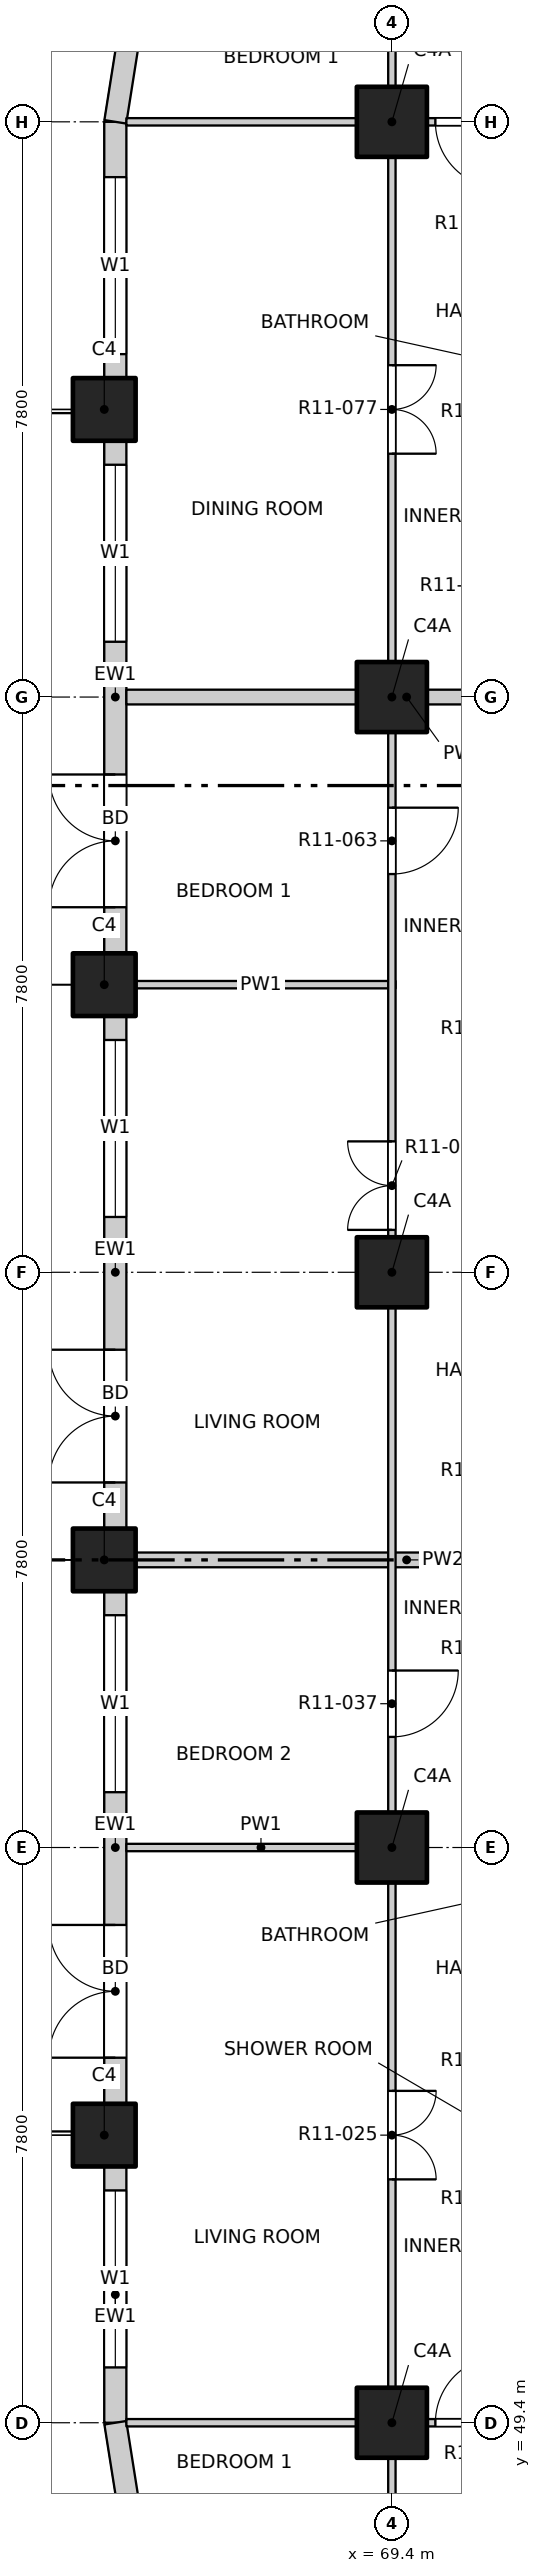
"""IFC4 building model, lengths in metres.
Left out: names, types, materials, properties, quantities, classifications, styles, units other than length and angle.
Written with IfcOpenShell. Run it as: python <this file> out.ifc"""

import sys

from ifc_helpers import new_model, si_unit, direction, frame, frame_2d, origin, origin_2d, place, context, subcontext, project, spatial, rectangle, extrude, element, fill, save


model = new_model("IFC4")
c1 = context("Model", 3, precision=1e-05, world=origin(), true_north=direction((0.0, 1.0)))
c2 = subcontext(c1, "Body", "Model", "MODEL_VIEW")
j1 = project(units=[si_unit("LENGTHUNIT", "METRE"), si_unit("PLANEANGLEUNIT", "RADIAN")], contexts=[c1])
p1 = place(None, origin())
s1 = spatial("IfcSite", under=j1, at=p1, CompositionType="ELEMENT")
p2 = place(p1, origin())
s2 = spatial("IfcBuilding", under=s1, at=p2, CompositionType="ELEMENT")
p3 = place(p2, frame((0.0, 0.0, 130.5)))
s3 = spatial("IfcBuildingStorey", under=s2, at=p3, CompositionType="ELEMENT", Elevation=130.5)
for number, where, z_axis, x_axis in (
    (1, (65.5, 53.3, -0.25), (0.0, 0.0, 1.0), (1.0, 0.0, 0.0)),
    (2, (65.5, 61.1, -0.25), (0.0, 0.0, 1.0), (1.0, 0.0, 0.0)),
    (3, (65.5, 68.9, -0.25), (0.0, 0.0, 1.0), (1.0, 0.0, 0.0)),
    (4, (65.5, 76.7, -0.25), (0.0, 0.0, 1.0), (1.0, 0.0, 0.0)),
):
    element("IfcColumn", number, at=place(p3, frame(where, z_axis=z_axis, x_axis=x_axis)), inside=s3, PredefinedType="COLUMN", context=c2, shape_type="SweptSolid", body=[
        extrude(rectangle(XDim=0.85, YDim=0.85, at=origin_2d()), origin(), (0.0, 0.0, 1.0), 3.4),
    ])
for number, where, z_axis, x_axis in (
    (5, (69.4, 49.4, -0.25), (0.0, 0.0, 1.0), (1.0, 0.0, 0.0)),
    (6, (69.4, 57.2, -0.25), (0.0, 0.0, 1.0), (1.0, 0.0, 0.0)),
    (7, (69.4, 65.0, -0.25), (0.0, 0.0, 1.0), (1.0, 0.0, 0.0)),
    (8, (69.4, 72.8, -0.25), (0.0, 0.0, 1.0), (1.0, 0.0, 0.0)),
    (9, (69.4, 80.6, -0.25), (0.0, 0.0, 1.0), (1.0, 0.0, 0.0)),
):
    element("IfcColumn", number, at=place(p3, frame(where, z_axis=z_axis, x_axis=x_axis)), inside=s3, PredefinedType="COLUMN", context=c2, shape_type="SweptSolid", body=[
        extrude(rectangle(XDim=0.95, YDim=0.95, at=origin_2d()), origin(), (0.0, 0.0, 1.0), 3.4),
    ])
p4 = place(p3, frame((65.65, 49.4, 0.0), z_axis=(0.0, 0.0, 1.0), x_axis=(0.0, 1.0, 0.0)))
e10 = element("IfcWall", 10, at=p4, inside=s3, PredefinedType="SOLIDWALL", context=c2, shape_type="SweptSolid", body=[
    extrude(rectangle(XDim=3.475, YDim=0.3, at=frame_2d((1.738, 0.0))), origin(), (0.0, 0.0, 1.0), 2.7),
])
p5 = place(p4, frame((0.75, 0.0, 0.9)))
e11 = element("IfcOpeningElement", 11, at=p5, cuts=e10, PredefinedType="OPENING", context=c2, shape_type="SweptSolid", body=[
    extrude(rectangle(XDim=2.4, YDim=1.8, at=frame_2d((1.2, 0.9))), frame((0.0, 0.16, 0.0), z_axis=(0.0, -1.0, 0.0), x_axis=(1.0, 0.0, 0.0)), (0.0, 0.0, 1.0), 0.32),
])
p6 = place(p3, frame((65.65, 53.725, 0.0), z_axis=(0.0, 0.0, 1.0), x_axis=(0.0, 1.0, 0.0)))
e12 = element("IfcWall", 12, at=p6, inside=s3, PredefinedType="SOLIDWALL", context=c2, shape_type="SweptSolid", body=[
    extrude(rectangle(XDim=6.95, YDim=0.3, at=frame_2d((3.475, 0.0))), origin(), (0.0, 0.0, 1.0), 2.7),
])
p7 = place(p6, frame((0.625, 0.0, 0.0)))
e13 = element("IfcOpeningElement", 13, at=p7, cuts=e12, PredefinedType="OPENING", context=c2, shape_type="SweptSolid", body=[
    extrude(rectangle(XDim=1.8, YDim=2.4, at=frame_2d((0.9, 1.2))), frame((0.0, 0.16, 0.0), z_axis=(0.0, -1.0, 0.0), x_axis=(1.0, 0.0, 0.0)), (0.0, 0.0, 1.0), 0.32),
])
p8 = place(p6, frame((4.225, 0.0, 0.9)))
e14 = element("IfcOpeningElement", 14, at=p8, cuts=e12, PredefinedType="OPENING", context=c2, shape_type="SweptSolid", body=[
    extrude(rectangle(XDim=2.4, YDim=1.8, at=frame_2d((1.2, 0.9))), frame((0.0, 0.16, 0.0), z_axis=(0.0, -1.0, 0.0), x_axis=(1.0, 0.0, 0.0)), (0.0, 0.0, 1.0), 0.32),
])
p9 = place(p3, frame((65.65, 61.525, 0.0), z_axis=(0.0, 0.0, 1.0), x_axis=(0.0, 1.0, 0.0)))
e15 = element("IfcWall", 15, at=p9, inside=s3, PredefinedType="SOLIDWALL", context=c2, shape_type="SweptSolid", body=[
    extrude(rectangle(XDim=6.95, YDim=0.3, at=frame_2d((3.475, 0.0))), origin(), (0.0, 0.0, 1.0), 2.7),
])
p10 = place(p9, frame((0.625, 0.0, 0.0)))
e16 = element("IfcOpeningElement", 16, at=p10, cuts=e15, PredefinedType="OPENING", context=c2, shape_type="SweptSolid", body=[
    extrude(rectangle(XDim=1.8, YDim=2.4, at=frame_2d((0.9, 1.2))), frame((0.0, 0.16, 0.0), z_axis=(0.0, -1.0, 0.0), x_axis=(1.0, 0.0, 0.0)), (0.0, 0.0, 1.0), 0.32),
])
p11 = place(p9, frame((4.225, 0.0, 0.9)))
e17 = element("IfcOpeningElement", 17, at=p11, cuts=e15, PredefinedType="OPENING", context=c2, shape_type="SweptSolid", body=[
    extrude(rectangle(XDim=2.4, YDim=1.8, at=frame_2d((1.2, 0.9))), frame((0.0, 0.16, 0.0), z_axis=(0.0, -1.0, 0.0), x_axis=(1.0, 0.0, 0.0)), (0.0, 0.0, 1.0), 0.32),
])
p12 = place(p3, frame((65.65, 69.325, 0.0), z_axis=(0.0, 0.0, 1.0), x_axis=(0.0, 1.0, 0.0)))
e18 = element("IfcWall", 18, at=p12, inside=s3, PredefinedType="SOLIDWALL", context=c2, shape_type="SweptSolid", body=[
    extrude(rectangle(XDim=6.95, YDim=0.3, at=frame_2d((3.475, 0.0))), origin(), (0.0, 0.0, 1.0), 2.7),
])
p13 = place(p12, frame((0.625, 0.0, 0.0)))
e19 = element("IfcOpeningElement", 19, at=p13, cuts=e18, PredefinedType="OPENING", context=c2, shape_type="SweptSolid", body=[
    extrude(rectangle(XDim=1.8, YDim=2.4, at=frame_2d((0.9, 1.2))), frame((0.0, 0.16, 0.0), z_axis=(0.0, -1.0, 0.0), x_axis=(1.0, 0.0, 0.0)), (0.0, 0.0, 1.0), 0.32),
])
p14 = place(p12, frame((4.225, 0.0, 0.9)))
e20 = element("IfcOpeningElement", 20, at=p14, cuts=e18, PredefinedType="OPENING", context=c2, shape_type="SweptSolid", body=[
    extrude(rectangle(XDim=2.4, YDim=1.8, at=frame_2d((1.2, 0.9))), frame((0.0, 0.16, 0.0), z_axis=(0.0, -1.0, 0.0), x_axis=(1.0, 0.0, 0.0)), (0.0, 0.0, 1.0), 0.32),
])
p15 = place(p3, frame((65.65, 77.125, 0.0), z_axis=(0.0, 0.0, 1.0), x_axis=(0.0, 1.0, 0.0)))
e21 = element("IfcWall", 21, at=p15, inside=s3, PredefinedType="SOLIDWALL", context=c2, shape_type="SweptSolid", body=[
    extrude(rectangle(XDim=3.475, YDim=0.3, at=frame_2d((1.738, 0.0))), origin(), (0.0, 0.0, 1.0), 2.7),
])
p16 = place(p15, frame((0.325, 0.0, 0.9)))
e22 = element("IfcOpeningElement", 22, at=p16, cuts=e21, PredefinedType="OPENING", context=c2, shape_type="SweptSolid", body=[
    extrude(rectangle(XDim=2.4, YDim=1.8, at=frame_2d((1.2, 0.9))), frame((0.0, 0.16, 0.0), z_axis=(0.0, -1.0, 0.0), x_axis=(1.0, 0.0, 0.0)), (0.0, 0.0, 1.0), 0.32),
])
for number, where, z_axis, x_axis in (
    (23, (65.833, 81.759, 0.0), (0.0, 0.0, 1.0), (-0.156, -0.988, 0.0)),
    (24, (65.65, 49.4, 0.0), (0.0, 0.0, 1.0), (0.156, -0.988, 0.0)),
):
    element("IfcWall", number, at=place(p3, frame(where, z_axis=z_axis, x_axis=x_axis)), inside=s3, PredefinedType="SOLIDWALL", context=c2, shape_type="SweptSolid", body=[
        extrude(rectangle(XDim=1.173, YDim=0.3, at=frame_2d((0.586, 0.0))), origin(), (0.0, 0.0, 1.0), 2.7),
    ])
p17 = place(p3, frame((65.8, 49.4, 0.0), z_axis=(0.0, 0.0, 1.0), x_axis=(1.0, 0.0, 0.0)))
e25 = element("IfcWall", 25, at=p17, inside=s3, PredefinedType="PARTITIONING", context=c2, shape_type="SweptSolid", body=[
    extrude(rectangle(XDim=38.4, YDim=0.1, at=frame_2d((19.2, 0.0))), origin(), (0.0, 0.0, 1.0), 3.15),
])
p18 = place(p17, frame((4.19, 0.0, 0.0)))
e26 = element("IfcOpeningElement", 26, at=p18, cuts=e25, PredefinedType="OPENING", context=c2, shape_type="SweptSolid", body=[
    extrude(rectangle(XDim=0.9, YDim=2.1, at=frame_2d((0.45, 1.05))), frame((0.0, 0.06, 0.0), z_axis=(0.0, -1.0, 0.0), x_axis=(1.0, 0.0, 0.0)), (0.0, 0.0, 1.0), 0.12),
])
p19 = place(p17, frame((9.0, 0.0, 0.0)))
e27 = element("IfcOpeningElement", 27, at=p19, cuts=e25, PredefinedType="OPENING", context=c2, shape_type="SweptSolid", body=[
    extrude(rectangle(XDim=0.9, YDim=2.1, at=frame_2d((0.45, 1.05))), frame((0.0, 0.06, 0.0), z_axis=(0.0, -1.0, 0.0), x_axis=(1.0, 0.0, 0.0)), (0.0, 0.0, 1.0), 0.12),
])
p20 = place(p17, frame((12.9, 0.0, 0.0)))
e28 = element("IfcOpeningElement", 28, at=p20, cuts=e25, PredefinedType="OPENING", context=c2, shape_type="SweptSolid", body=[
    extrude(rectangle(XDim=0.9, YDim=2.1, at=frame_2d((0.45, 1.05))), frame((0.0, 0.06, 0.0), z_axis=(0.0, -1.0, 0.0), x_axis=(1.0, 0.0, 0.0)), (0.0, 0.0, 1.0), 0.12),
])
p21 = place(p17, frame((16.8, 0.0, 0.0)))
e29 = element("IfcOpeningElement", 29, at=p21, cuts=e25, PredefinedType="OPENING", context=c2, shape_type="SweptSolid", body=[
    extrude(rectangle(XDim=0.9, YDim=2.1, at=frame_2d((0.45, 1.05))), frame((0.0, 0.06, 0.0), z_axis=(0.0, -1.0, 0.0), x_axis=(1.0, 0.0, 0.0)), (0.0, 0.0, 1.0), 0.12),
])
p22 = place(p17, frame((20.7, 0.0, 0.0)))
e30 = element("IfcOpeningElement", 30, at=p22, cuts=e25, PredefinedType="OPENING", context=c2, shape_type="SweptSolid", body=[
    extrude(rectangle(XDim=0.9, YDim=2.1, at=frame_2d((0.45, 1.05))), frame((0.0, 0.06, 0.0), z_axis=(0.0, -1.0, 0.0), x_axis=(1.0, 0.0, 0.0)), (0.0, 0.0, 1.0), 0.12),
])
p23 = place(p17, frame((24.6, 0.0, 0.0)))
e31 = element("IfcOpeningElement", 31, at=p23, cuts=e25, PredefinedType="OPENING", context=c2, shape_type="SweptSolid", body=[
    extrude(rectangle(XDim=0.9, YDim=2.1, at=frame_2d((0.45, 1.05))), frame((0.0, 0.06, 0.0), z_axis=(0.0, -1.0, 0.0), x_axis=(1.0, 0.0, 0.0)), (0.0, 0.0, 1.0), 0.12),
])
p24 = place(p17, frame((28.5, 0.0, 0.0)))
e32 = element("IfcOpeningElement", 32, at=p24, cuts=e25, PredefinedType="OPENING", context=c2, shape_type="SweptSolid", body=[
    extrude(rectangle(XDim=0.9, YDim=2.1, at=frame_2d((0.45, 1.05))), frame((0.0, 0.06, 0.0), z_axis=(0.0, -1.0, 0.0), x_axis=(1.0, 0.0, 0.0)), (0.0, 0.0, 1.0), 0.12),
])
p25 = place(p17, frame((33.31, 0.0, 0.0)))
e33 = element("IfcOpeningElement", 33, at=p25, cuts=e25, PredefinedType="OPENING", context=c2, shape_type="SweptSolid", body=[
    extrude(rectangle(XDim=0.9, YDim=2.1, at=frame_2d((0.45, 1.05))), frame((0.0, 0.06, 0.0), z_axis=(0.0, -1.0, 0.0), x_axis=(1.0, 0.0, 0.0)), (0.0, 0.0, 1.0), 0.12),
])
p26 = place(p3, frame((65.8, 57.2, 0.0), z_axis=(0.0, 0.0, 1.0), x_axis=(1.0, 0.0, 0.0)))
e34 = element("IfcWall", 34, at=p26, inside=s3, PredefinedType="PARTITIONING", context=c2, shape_type="SweptSolid", body=[
    extrude(rectangle(XDim=3.65, YDim=0.1, at=frame_2d((1.825, 0.0))), origin(), (0.0, 0.0, 1.0), 3.15),
])
p27 = place(p3, frame((65.8, 61.1, 0.0), z_axis=(0.0, 0.0, 1.0), x_axis=(1.0, 0.0, 0.0)))
e35 = element("IfcWall", 35, at=p27, inside=s3, PredefinedType="PARTITIONING", context=c2, shape_type="SweptSolid", body=[
    extrude(rectangle(XDim=7.6, YDim=0.2, at=frame_2d((3.8, 0.0))), origin(), (0.0, 0.0, 1.0), 2.55),
])
p28 = place(p3, frame((65.8, 68.9, 0.0), z_axis=(0.0, 0.0, 1.0), x_axis=(1.0, 0.0, 0.0)))
e36 = element("IfcWall", 36, at=p28, inside=s3, PredefinedType="PARTITIONING", context=c2, shape_type="SweptSolid", body=[
    extrude(rectangle(XDim=3.65, YDim=0.1, at=frame_2d((1.825, 0.0))), origin(), (0.0, 0.0, 1.0), 2.55),
])
p29 = place(p3, frame((65.8, 72.8, 0.0), z_axis=(0.0, 0.0, 1.0), x_axis=(1.0, 0.0, 0.0)))
e37 = element("IfcWall", 37, at=p29, inside=s3, PredefinedType="PARTITIONING", context=c2, shape_type="SweptSolid", body=[
    extrude(rectangle(XDim=7.6, YDim=0.2, at=frame_2d((3.8, 0.0))), origin(), (0.0, 0.0, 1.0), 3.15),
])
p30 = place(p3, frame((65.8, 80.6, 0.0), z_axis=(0.0, 0.0, 1.0), x_axis=(1.0, 0.0, 0.0)))
e38 = element("IfcWall", 38, at=p30, inside=s3, PredefinedType="PARTITIONING", context=c2, shape_type="SweptSolid", body=[
    extrude(rectangle(XDim=7.6, YDim=0.1, at=frame_2d((3.8, 0.0))), origin(), (0.0, 0.0, 1.0), 3.15),
])
p31 = place(p30, frame((4.19, 0.0, 0.0)))
e39 = element("IfcOpeningElement", 39, at=p31, cuts=e38, PredefinedType="OPENING", context=c2, shape_type="SweptSolid", body=[
    extrude(rectangle(XDim=0.9, YDim=2.1, at=frame_2d((0.45, 1.05))), frame((0.0, 0.06, 0.0), z_axis=(0.0, -1.0, 0.0), x_axis=(1.0, 0.0, 0.0)), (0.0, 0.0, 1.0), 0.12),
])
p32 = place(p3, frame((69.4, 45.8, 0.0), z_axis=(0.0, 0.0, 1.0), x_axis=(0.0, 1.0, 0.0)))
e40 = element("IfcWall", 40, at=p32, inside=s3, PredefinedType="PARTITIONING", context=c2, shape_type="SweptSolid", body=[
    extrude(rectangle(XDim=38.4, YDim=0.1, at=frame_2d((19.2, 0.0))), origin(), (0.0, 0.0, 1.0), 3.15),
])
p33 = place(p32, frame((1.05, 0.0, 0.0)))
e41 = element("IfcOpeningElement", 41, at=p33, cuts=e40, PredefinedType="OPENING", context=c2, shape_type="SweptSolid", body=[
    extrude(rectangle(XDim=1.2, YDim=2.1, at=frame_2d((0.6, 1.05))), frame((0.0, 0.06, 0.0), z_axis=(0.0, -1.0, 0.0), x_axis=(1.0, 0.0, 0.0)), (0.0, 0.0, 1.0), 0.12),
])
p34 = place(p32, frame((6.9, 0.0, 0.0)))
e42 = element("IfcOpeningElement", 42, at=p34, cuts=e40, PredefinedType="OPENING", context=c2, shape_type="SweptSolid", body=[
    extrude(rectangle(XDim=1.2, YDim=2.1, at=frame_2d((0.6, 1.05))), frame((0.0, 0.06, 0.0), z_axis=(0.0, -1.0, 0.0), x_axis=(1.0, 0.0, 0.0)), (0.0, 0.0, 1.0), 0.12),
])
p35 = place(p32, frame((12.9, 0.0, 0.0)))
e43 = element("IfcOpeningElement", 43, at=p35, cuts=e40, PredefinedType="OPENING", context=c2, shape_type="SweptSolid", body=[
    extrude(rectangle(XDim=0.9, YDim=2.1, at=frame_2d((0.45, 1.05))), frame((0.0, 0.06, 0.0), z_axis=(0.0, -1.0, 0.0), x_axis=(1.0, 0.0, 0.0)), (0.0, 0.0, 1.0), 0.12),
])
p36 = place(p32, frame((19.775, 0.0, 0.0)))
e44 = element("IfcOpeningElement", 44, at=p36, cuts=e40, PredefinedType="OPENING", context=c2, shape_type="SweptSolid", body=[
    extrude(rectangle(XDim=1.2, YDim=2.1, at=frame_2d((0.6, 1.05))), frame((0.0, 0.06, 0.0), z_axis=(0.0, -1.0, 0.0), x_axis=(1.0, 0.0, 0.0)), (0.0, 0.0, 1.0), 0.12),
])
p37 = place(p32, frame((24.6, 0.0, 0.0)))
e45 = element("IfcOpeningElement", 45, at=p37, cuts=e40, PredefinedType="OPENING", context=c2, shape_type="SweptSolid", body=[
    extrude(rectangle(XDim=0.9, YDim=2.1, at=frame_2d((0.45, 1.05))), frame((0.0, 0.06, 0.0), z_axis=(0.0, -1.0, 0.0), x_axis=(1.0, 0.0, 0.0)), (0.0, 0.0, 1.0), 0.12),
])
p38 = place(p32, frame((30.3, 0.0, 0.0)))
e46 = element("IfcOpeningElement", 46, at=p38, cuts=e40, PredefinedType="OPENING", context=c2, shape_type="SweptSolid", body=[
    extrude(rectangle(XDim=1.2, YDim=2.1, at=frame_2d((0.6, 1.05))), frame((0.0, 0.06, 0.0), z_axis=(0.0, -1.0, 0.0), x_axis=(1.0, 0.0, 0.0)), (0.0, 0.0, 1.0), 0.12),
])
p39 = place(p32, frame((36.15, 0.0, 0.0)))
e47 = element("IfcOpeningElement", 47, at=p39, cuts=e40, PredefinedType="OPENING", context=c2, shape_type="SweptSolid", body=[
    extrude(rectangle(XDim=1.2, YDim=2.1, at=frame_2d((0.6, 1.05))), frame((0.0, 0.06, 0.0), z_axis=(0.0, -1.0, 0.0), x_axis=(1.0, 0.0, 0.0)), (0.0, 0.0, 1.0), 0.12),
])
p40 = place(p5, origin())
e48 = element("IfcWindow", 48, at=p40, inside=s3, PartitioningType="DOUBLE_PANEL_VERTICAL", PredefinedType="WINDOW", context=c2, shape_type="SweptSolid", body=[
    extrude(rectangle(XDim=2.4, YDim=1.8, at=frame_2d((1.2, 0.9))), frame((0.0, 0.03, 0.0), z_axis=(0.0, -1.0, 0.0), x_axis=(1.0, 0.0, 0.0)), (0.0, 0.0, 1.0), 0.06),
])
fill(e11, e48)
p41 = place(p7, origin())
e49 = element("IfcDoor", 49, at=p41, inside=s3, OperationType="DOUBLE_DOOR_SINGLE_SWING", PredefinedType="DOOR", context=c2, shape_type="SweptSolid", body=[
    extrude(rectangle(XDim=1.8, YDim=2.4, at=frame_2d((0.9, 1.2))), frame((0.0, 0.025, 0.0), z_axis=(0.0, -1.0, 0.0), x_axis=(1.0, 0.0, 0.0)), (0.0, 0.0, 1.0), 0.05),
])
fill(e13, e49)
p42 = place(p8, origin())
e50 = element("IfcWindow", 50, at=p42, inside=s3, PartitioningType="DOUBLE_PANEL_VERTICAL", PredefinedType="WINDOW", context=c2, shape_type="SweptSolid", body=[
    extrude(rectangle(XDim=2.4, YDim=1.8, at=frame_2d((1.2, 0.9))), frame((0.0, 0.03, 0.0), z_axis=(0.0, -1.0, 0.0), x_axis=(1.0, 0.0, 0.0)), (0.0, 0.0, 1.0), 0.06),
])
fill(e14, e50)
p43 = place(p10, origin())
e51 = element("IfcDoor", 51, at=p43, inside=s3, OperationType="DOUBLE_DOOR_SINGLE_SWING", PredefinedType="DOOR", context=c2, shape_type="SweptSolid", body=[
    extrude(rectangle(XDim=1.8, YDim=2.4, at=frame_2d((0.9, 1.2))), frame((0.0, 0.025, 0.0), z_axis=(0.0, -1.0, 0.0), x_axis=(1.0, 0.0, 0.0)), (0.0, 0.0, 1.0), 0.05),
])
fill(e16, e51)
p44 = place(p11, origin())
e52 = element("IfcWindow", 52, at=p44, inside=s3, PartitioningType="DOUBLE_PANEL_VERTICAL", PredefinedType="WINDOW", context=c2, shape_type="SweptSolid", body=[
    extrude(rectangle(XDim=2.4, YDim=1.8, at=frame_2d((1.2, 0.9))), frame((0.0, 0.03, 0.0), z_axis=(0.0, -1.0, 0.0), x_axis=(1.0, 0.0, 0.0)), (0.0, 0.0, 1.0), 0.06),
])
fill(e17, e52)
p45 = place(p13, origin())
e53 = element("IfcDoor", 53, at=p45, inside=s3, OperationType="DOUBLE_DOOR_SINGLE_SWING", PredefinedType="DOOR", context=c2, shape_type="SweptSolid", body=[
    extrude(rectangle(XDim=1.8, YDim=2.4, at=frame_2d((0.9, 1.2))), frame((0.0, 0.025, 0.0), z_axis=(0.0, -1.0, 0.0), x_axis=(1.0, 0.0, 0.0)), (0.0, 0.0, 1.0), 0.05),
])
fill(e19, e53)
p46 = place(p14, origin())
e54 = element("IfcWindow", 54, at=p46, inside=s3, PartitioningType="DOUBLE_PANEL_VERTICAL", PredefinedType="WINDOW", context=c2, shape_type="SweptSolid", body=[
    extrude(rectangle(XDim=2.4, YDim=1.8, at=frame_2d((1.2, 0.9))), frame((0.0, 0.03, 0.0), z_axis=(0.0, -1.0, 0.0), x_axis=(1.0, 0.0, 0.0)), (0.0, 0.0, 1.0), 0.06),
])
fill(e20, e54)
p47 = place(p16, origin())
e55 = element("IfcWindow", 55, at=p47, inside=s3, PartitioningType="DOUBLE_PANEL_VERTICAL", PredefinedType="WINDOW", context=c2, shape_type="SweptSolid", body=[
    extrude(rectangle(XDim=2.4, YDim=1.8, at=frame_2d((1.2, 0.9))), frame((0.0, 0.03, 0.0), z_axis=(0.0, -1.0, 0.0), x_axis=(1.0, 0.0, 0.0)), (0.0, 0.0, 1.0), 0.06),
])
fill(e22, e55)
p48 = place(p18, origin())
e56 = element("IfcDoor", 56, at=p48, inside=s3, OperationType="SINGLE_SWING_RIGHT", PredefinedType="DOOR", context=c2, shape_type="SweptSolid", body=[
    extrude(rectangle(XDim=0.9, YDim=2.1, at=frame_2d((0.45, 1.05))), frame((0.0, 0.025, 0.0), z_axis=(0.0, -1.0, 0.0), x_axis=(1.0, 0.0, 0.0)), (0.0, 0.0, 1.0), 0.05),
])
fill(e26, e56)
p49 = place(p34, origin())
e57 = element("IfcDoor", 57, at=p49, inside=s3, OperationType="DOUBLE_DOOR_SINGLE_SWING", PredefinedType="DOOR", context=c2, shape_type="SweptSolid", body=[
    extrude(rectangle(XDim=1.2, YDim=2.1, at=frame_2d((0.6, 1.05))), frame((0.0, 0.025, 0.0), z_axis=(0.0, -1.0, 0.0), x_axis=(1.0, 0.0, 0.0)), (0.0, 0.0, 1.0), 0.05),
])
fill(e42, e57)
p50 = place(p35, origin())
e58 = element("IfcDoor", 58, at=p50, inside=s3, OperationType="SINGLE_SWING_LEFT", PredefinedType="DOOR", context=c2, shape_type="SweptSolid", body=[
    extrude(rectangle(XDim=0.9, YDim=2.1, at=frame_2d((0.45, 1.05))), frame((0.0, 0.025, 0.0), z_axis=(0.0, -1.0, 0.0), x_axis=(1.0, 0.0, 0.0)), (0.0, 0.0, 1.0), 0.05),
])
fill(e43, e58)
p51 = place(p36, origin())
e59 = element("IfcDoor", 59, at=p51, inside=s3, OperationType="DOUBLE_DOOR_SINGLE_SWING", PredefinedType="DOOR", context=c2, shape_type="SweptSolid", body=[
    extrude(rectangle(XDim=1.2, YDim=2.1, at=frame_2d((0.6, 1.05))), frame((0.0, 0.025, 0.0), z_axis=(0.0, -1.0, 0.0), x_axis=(1.0, 0.0, 0.0)), (0.0, 0.0, 1.0), 0.05),
])
fill(e44, e59)
p52 = place(p37, origin())
e60 = element("IfcDoor", 60, at=p52, inside=s3, OperationType="SINGLE_SWING_LEFT", PredefinedType="DOOR", context=c2, shape_type="SweptSolid", body=[
    extrude(rectangle(XDim=0.9, YDim=2.1, at=frame_2d((0.45, 1.05))), frame((0.0, 0.025, 0.0), z_axis=(0.0, -1.0, 0.0), x_axis=(1.0, 0.0, 0.0)), (0.0, 0.0, 1.0), 0.05),
])
fill(e45, e60)
p53 = place(p38, origin())
e61 = element("IfcDoor", 61, at=p53, inside=s3, OperationType="DOUBLE_DOOR_SINGLE_SWING", PredefinedType="DOOR", context=c2, shape_type="SweptSolid", body=[
    extrude(rectangle(XDim=1.2, YDim=2.1, at=frame_2d((0.6, 1.05))), frame((0.0, 0.025, 0.0), z_axis=(0.0, -1.0, 0.0), x_axis=(1.0, 0.0, 0.0)), (0.0, 0.0, 1.0), 0.05),
])
fill(e46, e61)
p54 = place(p31, origin())
e62 = element("IfcDoor", 62, at=p54, inside=s3, OperationType="SINGLE_SWING_LEFT", PredefinedType="DOOR", context=c2, shape_type="SweptSolid", body=[
    extrude(rectangle(XDim=0.9, YDim=2.1, at=frame_2d((0.45, 1.05))), frame((0.0, 0.025, 0.0), z_axis=(0.0, -1.0, 0.0), x_axis=(1.0, 0.0, 0.0)), (0.0, 0.0, 1.0), 0.05),
])
fill(e39, e62)
save(model, sys.argv[1])
